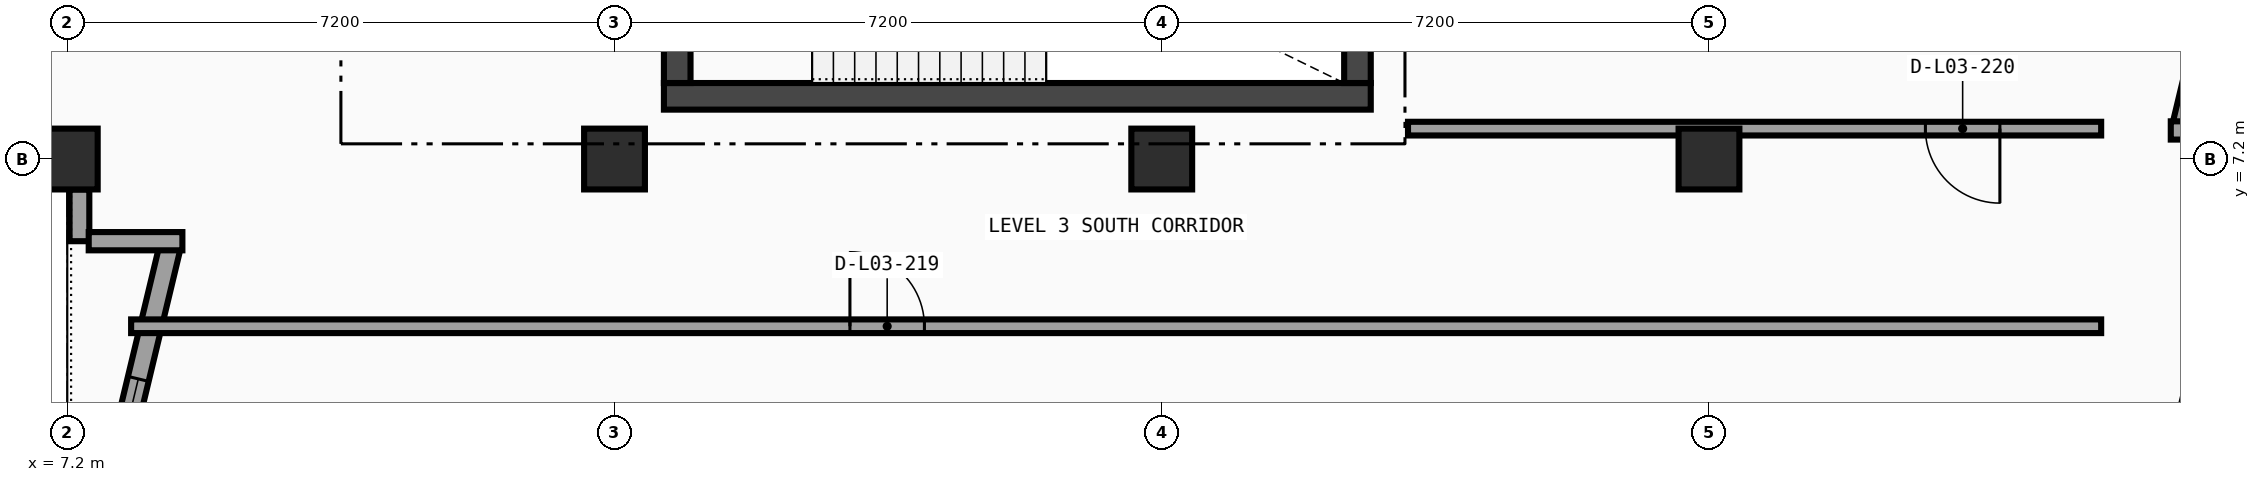
"""IFC4 building model, lengths in metres.
Left out: names, types, materials, properties, quantities, classifications, styles, units other than length and angle.
Written with IfcOpenShell. Run it as: python <this file> out.ifc"""

import sys

from ifc_helpers import new_model, si_unit, direction, frame, frame_2d, origin, origin_2d, place, context, subcontext, project, spatial, rectangle, extrude, element, fill, save


model = new_model("IFC4")
c1 = context("Model", 3, precision=1e-05, world=origin(), true_north=direction((0.0, 1.0)))
c2 = subcontext(c1, "Body", "Model", "MODEL_VIEW")
j1 = project(units=[si_unit("LENGTHUNIT", "METRE"), si_unit("PLANEANGLEUNIT", "RADIAN")], contexts=[c1])
p1 = place(None, origin())
s1 = spatial("IfcSite", under=j1, at=p1, CompositionType="ELEMENT")
p2 = place(p1, origin())
s2 = spatial("IfcBuilding", under=s1, at=p2, CompositionType="ELEMENT")
p3 = place(p2, frame((0.0, 0.0, 14.7)))
s3 = spatial("IfcBuildingStorey", under=s2, at=p3, CompositionType="ELEMENT", Elevation=14.7)
for number, where, z_axis, x_axis in (
    (1, (7.2, 7.2, 0.0), (0.0, 0.0, 1.0), (1.0, 0.0, 0.0)),
    (2, (14.4, 7.2, 0.0), (0.0, 0.0, 1.0), (1.0, 0.0, 0.0)),
    (3, (21.6, 7.2, 0.0), (0.0, 0.0, 1.0), (1.0, 0.0, 0.0)),
    (4, (28.8, 7.2, 0.0), (0.0, 0.0, 1.0), (1.0, 0.0, 0.0)),
):
    element("IfcColumn", number, at=place(p3, frame(where, z_axis=z_axis, x_axis=x_axis)), inside=s3, PredefinedType="COLUMN", context=c2, shape_type="SweptSolid", body=[
        extrude(rectangle(XDim=0.8, YDim=0.8, at=origin_2d()), origin(), (0.0, 0.0, 1.0), 4.2),
    ])
p4 = place(p3, frame((35.84, 10.988, 0.0), z_axis=(0.0, 0.0, 1.0), x_axis=(-0.23342163795, -0.972375616178, 0.0)))
e5 = element("IfcWall", 5, at=p4, inside=s3, PredefinedType="SOLIDWALL", context=c2, shape_type="SweptSolid", body=[
    extrude(rectangle(XDim=3.414, YDim=0.28, at=frame_2d((1.707, 0.0))), origin(), (0.0, 0.0, 1.0), 3.95),
])
p5 = place(p4, frame((0.857, 0.0, 0.8)))
e6 = element("IfcOpeningElement", 6, at=p5, cuts=e5, PredefinedType="OPENING", context=c2, shape_type="SweptSolid", body=[
    extrude(rectangle(XDim=1.7, YDim=1.85, at=frame_2d((0.85, 0.925))), frame((0.0, 0.15, 0.0), z_axis=(0.0, -1.0, 0.0), x_axis=(1.0, 0.0, 0.0)), (0.0, 0.0, 1.0), 0.3),
])
p6 = place(p3, frame((34.876, 7.576, 0.0), z_axis=(0.0, 0.0, 1.0), x_axis=(1.0, 0.0, 0.0)))
e7 = element("IfcWall", 7, at=p6, inside=s3, PredefinedType="SOLIDWALL", context=c2, shape_type="SweptSolid", body=[
    extrude(rectangle(XDim=0.832, YDim=0.24, at=frame_2d((0.416, 0.0))), origin(), (0.0, 0.0, 1.0), 3.95),
])
p7 = place(p3, frame((35.84, 6.824, 0.0), z_axis=(0.0, 0.0, 1.0), x_axis=(-0.233451302002, -0.972368494756, 0.0)))
e8 = element("IfcWall", 8, at=p7, inside=s3, PredefinedType="SOLIDWALL", context=c2, shape_type="SweptSolid", body=[
    extrude(rectangle(XDim=3.064, YDim=0.28, at=frame_2d((1.532, 0.0))), origin(), (0.0, 0.0, 1.0), 3.366),
])
p8 = place(p7, frame((0.682, 0.0, 0.8)))
e9 = element("IfcOpeningElement", 9, at=p8, cuts=e8, PredefinedType="OPENING", context=c2, shape_type="SweptSolid", body=[
    extrude(rectangle(XDim=1.7, YDim=1.85, at=frame_2d((0.85, 0.925))), frame((0.0, 0.15, 0.0), z_axis=(0.0, -1.0, 0.0), x_axis=(1.0, 0.0, 0.0)), (0.0, 0.0, 1.0), 0.3),
])
p9 = place(p3, frame((7.36, 6.119, 0.0), z_axis=(0.0, 0.0, 1.0), x_axis=(0.0, 1.0, 0.0)))
e10 = element("IfcWall", 10, at=p9, inside=s3, PredefinedType="SOLIDWALL", context=c2, shape_type="SweptSolid", body=[
    extrude(rectangle(XDim=0.68, YDim=0.26, at=frame_2d((0.34, 0.0))), origin(), (0.0, 0.0, 1.0), 3.352),
])
p10 = place(p3, frame((7.36, 1.081, 0.0), z_axis=(0.0, 0.0, 1.0), x_axis=(0.233432863536, 0.972372921374, 0.0)))
e11 = element("IfcWall", 11, at=p10, inside=s3, PredefinedType="SOLIDWALL", context=c2, shape_type="SweptSolid", body=[
    extrude(rectangle(XDim=5.086, YDim=0.28, at=frame_2d((2.543, 0.0))), origin(), (0.0, 0.0, 1.0), 3.352),
])
p11 = place(p10, frame((1.768, 0.0, 0.8)))
e12 = element("IfcOpeningElement", 12, at=p11, cuts=e11, PredefinedType="OPENING", context=c2, shape_type="SweptSolid", body=[
    extrude(rectangle(XDim=1.55, YDim=1.8, at=frame_2d((0.775, 0.9))), frame((0.0, 0.15, 0.0), z_axis=(0.0, -1.0, 0.0), x_axis=(1.0, 0.0, 0.0)), (0.0, 0.0, 1.0), 0.3),
])
p12 = place(p3, frame((8.715, 6.119, 0.0), z_axis=(0.0, 0.0, 1.0), x_axis=(-1.0, 0.0, 0.0)))
e13 = element("IfcWall", 13, at=p12, inside=s3, PredefinedType="SOLIDWALL", context=c2, shape_type="SweptSolid", body=[
    extrude(rectangle(XDim=1.233, YDim=0.24, at=frame_2d((0.616, 0.0))), origin(), (0.0, 0.0, 1.0), 3.95),
])
p13 = place(p3, frame((15.05, 8.025, 0.0), z_axis=(0.0, 0.0, 1.0), x_axis=(1.0, 0.0, 0.0)))
e14 = element("IfcWall", 14, at=p13, inside=s3, PredefinedType="SHEAR", context=c2, shape_type="SweptSolid", body=[
    extrude(rectangle(XDim=9.3, YDim=0.35, at=frame_2d((4.65, 0.0))), origin(), (0.0, 0.0, 1.0), 3.95),
])
p14 = place(p3, frame((15.225, 11.6, 0.0), z_axis=(0.0, 0.0, 1.0), x_axis=(0.0, -1.0, 0.0)))
e15 = element("IfcWall", 15, at=p14, inside=s3, PredefinedType="SHEAR", context=c2, shape_type="SweptSolid", body=[
    extrude(rectangle(XDim=3.4, YDim=0.35, at=frame_2d((1.7, 0.0))), origin(), (0.0, 0.0, 1.0), 3.95),
])
p15 = place(p14, frame((1.125, 0.0, 0.0)))
e16 = element("IfcOpeningElement", 16, at=p15, cuts=e15, PredefinedType="OPENING", context=c2, shape_type="SweptSolid", body=[
    extrude(rectangle(XDim=1.15, YDim=2.1, at=frame_2d((0.575, 1.05))), frame((0.0, 0.185, 0.0), z_axis=(0.0, -1.0, 0.0), x_axis=(1.0, 0.0, 0.0)), (0.0, 0.0, 1.0), 0.37),
])
p16 = place(p3, frame((24.175, 8.2, 0.0), z_axis=(0.0, 0.0, 1.0), x_axis=(0.0, 1.0, 0.0)))
e17 = element("IfcWall", 17, at=p16, inside=s3, PredefinedType="SHEAR", context=c2, shape_type="SweptSolid", body=[
    extrude(rectangle(XDim=3.4, YDim=0.35, at=frame_2d((1.7, 0.0))), origin(), (0.0, 0.0, 1.0), 3.95),
])
p17 = place(p3, frame((8.04, 5.0, 0.0), z_axis=(0.0, 0.0, 1.0), x_axis=(1.0, 0.0, 0.0)))
e18 = element("IfcWall", 18, at=p17, inside=s3, PredefinedType="PARTITIONING", context=c2, shape_type="SweptSolid", body=[
    extrude(rectangle(XDim=25.92, YDim=0.18, at=frame_2d((12.96, 0.0))), origin(), (0.0, 0.0, 1.0), 3.352),
])
p18 = place(p17, frame((9.458, 0.0, 0.0)))
e19 = element("IfcOpeningElement", 19, at=p18, cuts=e18, PredefinedType="OPENING", context=c2, shape_type="SweptSolid", body=[
    extrude(rectangle(XDim=0.98, YDim=2.1, at=frame_2d((0.49, 1.05))), frame((0.0, 0.1, 0.0), z_axis=(0.0, -1.0, 0.0), x_axis=(1.0, 0.0, 0.0)), (0.0, 0.0, 1.0), 0.2),
])
p19 = place(p3, frame((24.84, 7.6, 0.0), z_axis=(0.0, 0.0, 1.0), x_axis=(1.0, 0.0, 0.0)))
e20 = element("IfcWall", 20, at=p19, inside=s3, PredefinedType="PARTITIONING", context=c2, shape_type="SweptSolid", body=[
    extrude(rectangle(XDim=9.12, YDim=0.18, at=frame_2d((4.56, 0.0))), origin(), (0.0, 0.0, 1.0), 3.352),
])
p20 = place(p19, frame((6.808, 0.0, 0.0)))
e21 = element("IfcOpeningElement", 21, at=p20, cuts=e20, PredefinedType="OPENING", context=c2, shape_type="SweptSolid", body=[
    extrude(rectangle(XDim=0.98, YDim=2.1, at=frame_2d((0.49, 1.05))), frame((0.0, 0.1, 0.0), z_axis=(0.0, -1.0, 0.0), x_axis=(1.0, 0.0, 0.0)), (0.0, 0.0, 1.0), 0.2),
])
p21 = place(p11, origin())
e22 = element("IfcWindow", 22, at=p21, inside=s3, PartitioningType="SINGLE_PANEL", PredefinedType="WINDOW", context=c2, shape_type="SweptSolid", body=[
    extrude(rectangle(XDim=1.55, YDim=1.8, at=frame_2d((0.775, 0.9))), frame((0.0, 0.03, 0.0), z_axis=(0.0, -1.0, 0.0), x_axis=(1.0, 0.0, 0.0)), (0.0, 0.0, 1.0), 0.06),
])
fill(e12, e22)
p22 = place(p18, origin())
e23 = element("IfcDoor", 23, at=p22, inside=s3, OperationType="SINGLE_SWING_LEFT", PredefinedType="DOOR", context=c2, shape_type="SweptSolid", body=[
    extrude(rectangle(XDim=0.98, YDim=2.1, at=frame_2d((0.49, 1.05))), frame((0.0, 0.025, 0.0), z_axis=(0.0, -1.0, 0.0), x_axis=(1.0, 0.0, 0.0)), (0.0, 0.0, 1.0), 0.05),
])
fill(e19, e23)
p23 = place(p20, origin())
e24 = element("IfcDoor", 24, at=p23, inside=s3, OperationType="SINGLE_SWING_RIGHT", PredefinedType="DOOR", context=c2, shape_type="SweptSolid", body=[
    extrude(rectangle(XDim=0.98, YDim=2.1, at=frame_2d((0.49, 1.05))), frame((0.0, 0.025, 0.0), z_axis=(0.0, -1.0, 0.0), x_axis=(1.0, 0.0, 0.0)), (0.0, 0.0, 1.0), 0.05),
])
fill(e21, e24)
save(model, sys.argv[1])
